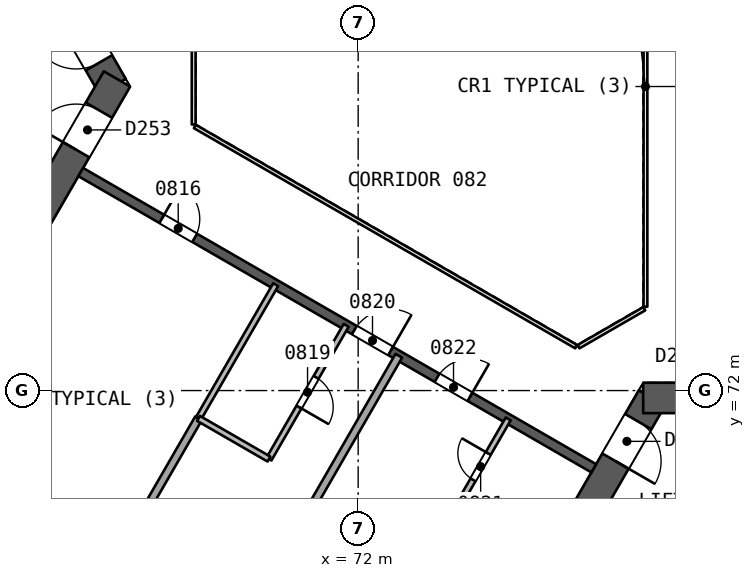
"""IFC4 building model, lengths in metres.
Left out: names, types, materials, properties, quantities, classifications, styles, units other than length and angle.
Written with IfcOpenShell. Run it as: python <this file> out.ifc"""

import sys

from ifc_helpers import new_model, si_unit, direction, frame, frame_2d, origin, place, context, subcontext, project, spatial, rectangle, extrude, element, fill, save


model = new_model("IFC4")
c1 = context("Model", 3, precision=1e-05, world=origin(), true_north=direction((0.0, 1.0)))
c2 = subcontext(c1, "Body", "Model", "MODEL_VIEW")
j1 = project(units=[si_unit("LENGTHUNIT", "METRE"), si_unit("PLANEANGLEUNIT", "RADIAN")], contexts=[c1])
p1 = place(None, origin())
s1 = spatial("IfcSite", under=j1, at=p1, CompositionType="ELEMENT")
p2 = place(p1, origin())
s2 = spatial("IfcBuilding", under=s1, at=p2, CompositionType="ELEMENT")
p3 = place(p2, frame((0.0, 0.0, 41.1)))
s3 = spatial("IfcBuildingStorey", under=s2, at=p3, CompositionType="ELEMENT", Elevation=41.1)
p4 = place(p3, frame((65.538, 80.0, 0.0), z_axis=(0.0, 0.0, 1.0), x_axis=(-0.49999662545, 0.866027352073, 0.0)))
e1 = element("IfcWall", 1, at=p4, inside=s3, PredefinedType="SHEAR", context=c2, shape_type="SweptSolid", body=[
    extrude(rectangle(XDim=10.149, YDim=0.8, at=frame_2d((5.074, 0.0))), origin(), (0.0, 0.0, 1.0), 3.7),
])
p5 = place(p4, frame((0.719, 0.0, 0.0)))
e2 = element("IfcOpeningElement", 2, at=p5, cuts=e1, PredefinedType="OPENING", context=c2, shape_type="SweptSolid", body=[
    extrude(rectangle(XDim=1.2, YDim=2.1, at=frame_2d((0.6, 1.05))), frame((0.0, 0.411, 0.0), z_axis=(0.0, -1.0, 0.0), x_axis=(1.0, 0.0, 0.0)), (0.0, 0.0, 1.0), 0.821),
])
p6 = place(p3, frame((60.664, 71.557, 0.0), z_axis=(0.0, 0.0, 1.0), x_axis=(0.50000409368, 0.866023040284, 0.0)))
e3 = element("IfcWall", 3, at=p6, inside=s3, PredefinedType="SHEAR", context=c2, shape_type="SweptSolid", body=[
    extrude(rectangle(XDim=9.98, YDim=0.8, at=frame_2d((4.99, 0.0))), origin(), (0.0, 0.0, 1.0), 3.7),
])
p7 = place(p6, frame((7.83, 0.0, 0.0)))
e4 = element("IfcOpeningElement", 4, at=p7, cuts=e3, PredefinedType="OPENING", context=c2, shape_type="SweptSolid", body=[
    extrude(rectangle(XDim=1.2, YDim=2.1, at=frame_2d((0.6, 1.05))), frame((0.0, 0.411, 0.0), z_axis=(0.0, -1.0, 0.0), x_axis=(1.0, 0.0, 0.0)), (0.0, 0.0, 1.0), 0.821),
])
p8 = place(p3, frame((79.731, 71.806, 0.0), z_axis=(0.0, 0.0, 1.0), x_axis=(-0.49999662545, -0.866027352073, 0.0)))
e5 = element("IfcWall", 5, at=p8, inside=s3, PredefinedType="SHEAR", context=c2, shape_type="SweptSolid", body=[
    extrude(rectangle(XDim=10.149, YDim=0.8, at=frame_2d((5.074, 0.0))), origin(), (0.0, 0.0, 1.0), 3.7),
])
p9 = place(p8, frame((0.719, 0.0, 0.0)))
e6 = element("IfcOpeningElement", 6, at=p9, cuts=e5, PredefinedType="OPENING", context=c2, shape_type="SweptSolid", body=[
    extrude(rectangle(XDim=1.2, YDim=2.1, at=frame_2d((0.6, 1.05))), frame((0.0, 0.411, 0.0), z_axis=(0.0, -1.0, 0.0), x_axis=(1.0, 0.0, 0.0)), (0.0, 0.0, 1.0), 0.821),
])
p10 = place(p3, frame((89.48, 71.806, 0.0), z_axis=(0.0, 0.0, 1.0), x_axis=(-1.0, 0.0, 0.0)))
e7 = element("IfcWall", 7, at=p10, inside=s3, PredefinedType="SHEAR", context=c2, shape_type="SweptSolid", body=[
    extrude(rectangle(XDim=9.98, YDim=0.8, at=frame_2d((4.99, 0.0))), origin(), (0.0, 0.0, 1.0), 3.7),
])
p11 = place(p10, frame((7.83, 0.0, 0.0)))
e8 = element("IfcOpeningElement", 8, at=p11, cuts=e7, PredefinedType="OPENING", context=c2, shape_type="SweptSolid", body=[
    extrude(rectangle(XDim=1.2, YDim=2.1, at=frame_2d((0.6, 1.05))), frame((0.0, 0.411, 0.0), z_axis=(0.0, -1.0, 0.0), x_axis=(1.0, 0.0, 0.0)), (0.0, 0.0, 1.0), 0.821),
])
p12 = place(p3, frame((64.7, 77.748, 0.0), z_axis=(0.0, 0.0, 1.0), x_axis=(0.866026492143, -0.499998114903, 0.0)))
e9 = element("IfcWall", 9, at=p12, inside=s3, PredefinedType="SHEAR", context=c2, shape_type="SweptSolid", body=[
    extrude(rectangle(XDim=15.588, YDim=0.25, at=frame_2d((7.794, 0.0))), origin(), (0.0, 0.0, 1.0), 3.2),
])
p13 = place(p12, frame((2.462, 0.0, 0.0)))
e10 = element("IfcOpeningElement", 10, at=p13, cuts=e9, PredefinedType="OPENING", context=c2, shape_type="SweptSolid", body=[
    extrude(rectangle(XDim=1.0, YDim=2.1, at=frame_2d((0.5, 1.05))), frame((0.0, 0.135, 0.0), z_axis=(0.0, -1.0, 0.0), x_axis=(1.0, 0.0, 0.0)), (0.0, 0.0, 1.0), 0.271),
])
p14 = place(p12, frame((8.315, 0.0, 0.0)))
e11 = element("IfcOpeningElement", 11, at=p14, cuts=e9, PredefinedType="OPENING", context=c2, shape_type="SweptSolid", body=[
    extrude(rectangle(XDim=1.1, YDim=2.1, at=frame_2d((0.55, 1.05))), frame((0.0, 0.135, 0.0), z_axis=(0.0, -1.0, 0.0), x_axis=(1.0, 0.0, 0.0)), (0.0, 0.0, 1.0), 0.271),
])
p15 = place(p12, frame((10.827, 0.0, 0.0)))
e12 = element("IfcOpeningElement", 12, at=p15, cuts=e9, PredefinedType="OPENING", context=c2, shape_type="SweptSolid", body=[
    extrude(rectangle(XDim=1.0, YDim=2.1, at=frame_2d((0.5, 1.05))), frame((0.0, 0.135, 0.0), z_axis=(0.0, -1.0, 0.0), x_axis=(1.0, 0.0, 0.0)), (0.0, 0.0, 1.0), 0.271),
])
p16 = place(p3, frame((62.817, 62.639, 0.0), z_axis=(0.0, 0.0, 1.0), x_axis=(0.499984050028, 0.866034612309, 0.0)))
e13 = element("IfcWall", 13, at=p16, inside=s3, PredefinedType="PARTITIONING", context=c2, shape_type="SweptSolid", body=[
    extrude(rectangle(XDim=9.964, YDim=0.2, at=frame_2d((4.982, 0.0))), origin(), (0.0, 0.0, 1.0), 3.2),
])
p17 = place(p3, frame((67.798, 71.268, 0.0), z_axis=(0.0, 0.0, 1.0), x_axis=(0.500029316959, 0.866008476969, 0.0)))
e14 = element("IfcWall", 14, at=p17, inside=s3, PredefinedType="PARTITIONING", context=c2, shape_type="SweptSolid", body=[
    extrude(rectangle(XDim=4.063, YDim=0.15, at=frame_2d((2.032, 0.0))), origin(), (0.0, 0.0, 1.0), 3.2),
])
p18 = place(p3, frame((71.684, 73.716, 0.0), z_axis=(0.0, 0.0, 1.0), x_axis=(-0.500010271798, -0.866019473278, 0.0)))
e15 = element("IfcWall", 15, at=p18, inside=s3, PredefinedType="PARTITIONING", context=c2, shape_type="SweptSolid", body=[
    extrude(rectangle(XDim=4.063, YDim=0.15, at=frame_2d((2.031, 0.0))), origin(), (0.0, 0.0, 1.0), 3.2),
])
p19 = place(p18, frame((1.582, 0.0, 0.0)))
e16 = element("IfcOpeningElement", 16, at=p19, cuts=e15, PredefinedType="OPENING", context=c2, shape_type="SweptSolid", body=[
    extrude(rectangle(XDim=0.9, YDim=2.1, at=frame_2d((0.45, 1.05))), frame((0.0, 0.085, 0.0), z_axis=(0.0, -1.0, 0.0), x_axis=(1.0, 0.0, 0.0)), (0.0, 0.0, 1.0), 0.171),
])
p20 = place(p3, frame((69.653, 70.197, 0.0), z_axis=(0.0, 0.0, 1.0), x_axis=(-0.86605268637, 0.499952742198, 0.0)))
e17 = element("IfcWall", 17, at=p20, inside=s3, PredefinedType="PARTITIONING", context=c2, shape_type="SweptSolid", body=[
    extrude(rectangle(XDim=2.141, YDim=0.15, at=frame_2d((1.071, 0.0))), origin(), (0.0, 0.0, 1.0), 3.2),
])
p21 = place(p3, frame((66.057, 60.768, 0.0), z_axis=(0.0, 0.0, 1.0), x_axis=(0.499997162821, 0.866027041824, 0.0)))
e18 = element("IfcWall", 18, at=p21, inside=s3, PredefinedType="PARTITIONING", context=c2, shape_type="SweptSolid", body=[
    extrude(rectangle(XDim=14.027, YDim=0.2, at=frame_2d((7.013, 0.0))), origin(), (0.0, 0.0, 1.0), 3.2),
])
p22 = place(p3, frame((74.498, 68.743, 0.0), z_axis=(0.0, 0.0, 1.0), x_axis=(0.499987231761, 0.866032775405, 0.0)))
e19 = element("IfcWall", 19, at=p22, inside=s3, PredefinedType="PARTITIONING", context=c2, shape_type="SweptSolid", body=[
    extrude(rectangle(XDim=2.9, YDim=0.15, at=frame_2d((1.45, 0.0))), origin(), (0.0, 0.0, 1.0), 3.2),
])
p23 = place(p22, frame((1.05, 0.0, 0.0)))
e20 = element("IfcOpeningElement", 20, at=p23, cuts=e19, PredefinedType="OPENING", context=c2, shape_type="SweptSolid", body=[
    extrude(rectangle(XDim=0.8, YDim=2.1, at=frame_2d((0.4, 1.05))), frame((0.0, 0.085, 0.0), z_axis=(0.0, -1.0, 0.0), x_axis=(1.0, 0.0, 0.0)), (0.0, 0.0, 1.0), 0.171),
])
p24 = place(p3, frame((90.854, 46.28, 0.0), z_axis=(0.0, 0.0, 1.0), x_axis=(-0.866026630825, 0.499997874697, 0.0)))
e21 = element("IfcWall", 21, at=p24, inside=s3, PredefinedType="SOLIDWALL", context=c2, shape_type="SweptSolid", body=[
    extrude(rectangle(XDim=61.18, YDim=0.3, at=frame_2d((30.59, 0.0))), origin(), (0.0, 0.0, 1.0), 3.2),
])
p25 = place(p24, frame((29.39, 0.0, 0.0)))
e22 = element("IfcOpeningElement", 22, at=p25, cuts=e21, PredefinedType="OPENING", context=c2, shape_type="SweptSolid", body=[
    extrude(rectangle(XDim=2.4, YDim=2.4, at=frame_2d((1.2, 1.2))), frame((0.0, 0.161, 0.0), z_axis=(0.0, -1.0, 0.0), x_axis=(1.0, 0.0, 0.0)), (0.0, 0.0, 1.0), 0.321),
])
p26 = place(p24, frame((34.223, 0.0, 0.0)))
e23 = element("IfcOpeningElement", 23, at=p26, cuts=e21, PredefinedType="OPENING", context=c2, shape_type="SweptSolid", body=[
    extrude(rectangle(XDim=2.4, YDim=2.4, at=frame_2d((1.2, 1.2))), frame((0.0, 0.161, 0.0), z_axis=(0.0, -1.0, 0.0), x_axis=(1.0, 0.0, 0.0)), (0.0, 0.0, 1.0), 0.321),
])
p27 = place(p24, frame((47.439, 0.0, 0.0)))
e24 = element("IfcOpeningElement", 24, at=p27, cuts=e21, PredefinedType="OPENING", context=c2, shape_type="SweptSolid", body=[
    extrude(rectangle(XDim=2.4, YDim=2.4, at=frame_2d((1.2, 1.2))), frame((0.0, 0.161, 0.0), z_axis=(0.0, -1.0, 0.0), x_axis=(1.0, 0.0, 0.0)), (0.0, 0.0, 1.0), 0.321),
])
p28 = place(p24, frame((13.116, 0.0, 0.0)))
e25 = element("IfcOpeningElement", 25, at=p28, cuts=e21, PredefinedType="OPENING", context=c2, shape_type="SweptSolid", body=[
    extrude(rectangle(XDim=2.4, YDim=2.4, at=frame_2d((1.2, 1.2))), frame((0.0, 0.161, 0.0), z_axis=(0.0, -1.0, 0.0), x_axis=(1.0, 0.0, 0.0)), (0.0, 0.0, 1.0), 0.321),
])
p29 = place(p3, frame((77.135, 64.952, 0.0), z_axis=(0.0, 0.0, 1.0), x_axis=(0.866031916153, 0.499988720078, 0.0)))
e26 = element("IfcWall", 26, at=p29, inside=s3, PredefinedType="SOLIDWALL", context=c2, shape_type="SweptSolid", body=[
    extrude(rectangle(XDim=11.35, YDim=0.2, at=frame_2d((5.675, 0.0))), origin(), (0.0, 0.0, 1.0), 3.2),
])
p30 = place(p3, frame((79.56, 74.206, 0.0), z_axis=(0.0, 0.0, 1.0), x_axis=(0.0, 1.0, 0.0)))
e27 = element("IfcWall", 27, at=p30, inside=s3, PredefinedType="PARTITIONING", context=c2, shape_type="SweptSolid", body=[
    extrude(rectangle(XDim=11.588, YDim=0.1, at=frame_2d((5.794, 0.0))), origin(), (0.0, 0.0, 1.0), 3.2),
])
p31 = place(p3, frame((67.672, 81.0, 0.0), z_axis=(0.0, 0.0, 1.0), x_axis=(0.0, -1.0, 0.0)))
e28 = element("IfcWall", 28, at=p31, inside=s3, PredefinedType="PARTITIONING", context=c2, shape_type="SweptSolid", body=[
    extrude(rectangle(XDim=2.0, YDim=0.1, at=frame_2d((1.0, 0.0))), origin(), (0.0, 0.0, 1.0), 3.2),
])
p32 = place(p3, frame((67.702, 78.948, 0.0), z_axis=(0.0, 0.0, 1.0), x_axis=(0.866026658274, -0.499997827154, 0.0)))
e29 = element("IfcWall", 29, at=p32, inside=s3, PredefinedType="PARTITIONING", context=c2, shape_type="SweptSolid", body=[
    extrude(rectangle(XDim=11.588, YDim=0.1, at=frame_2d((5.794, 0.0))), origin(), (0.0, 0.0, 1.0), 3.2),
])
p33 = place(p3, frame((77.798, 73.154, 0.0), z_axis=(0.0, 0.0, 1.0), x_axis=(0.866041268327, 0.499972520799, 0.0)))
e30 = element("IfcWall", 30, at=p33, inside=s3, PredefinedType="PARTITIONING", context=c2, shape_type="SweptSolid", body=[
    extrude(rectangle(XDim=2.0, YDim=0.1, at=frame_2d((1.0, 0.0))), origin(), (0.0, 0.0, 1.0), 3.2),
])
p34 = place(p13, origin())
e31 = element("IfcDoor", 31, at=p34, inside=s3, OperationType="SINGLE_SWING_LEFT", PredefinedType="NOTDEFINED", context=c2, shape_type="SweptSolid", body=[
    extrude(rectangle(XDim=1.0, YDim=2.1, at=frame_2d((0.5, 1.05))), frame((0.0, 0.025, 0.0), z_axis=(0.0, -1.0, 0.0), x_axis=(1.0, 0.0, 0.0)), (0.0, 0.0, 1.0), 0.05),
])
fill(e10, e31)
p35 = place(p19, origin())
e32 = element("IfcDoor", 32, at=p35, inside=s3, OperationType="SINGLE_SWING_RIGHT", PredefinedType="NOTDEFINED", context=c2, shape_type="SweptSolid", body=[
    extrude(rectangle(XDim=0.9, YDim=2.1, at=frame_2d((0.45, 1.05))), frame((0.0, 0.025, 0.0), z_axis=(0.0, -1.0, 0.0), x_axis=(1.0, 0.0, 0.0)), (0.0, 0.0, 1.0), 0.05),
])
fill(e16, e32)
p36 = place(p14, origin())
e33 = element("IfcDoor", 33, at=p36, inside=s3, OperationType="SINGLE_SWING_RIGHT", PredefinedType="NOTDEFINED", context=c2, shape_type="SweptSolid", body=[
    extrude(rectangle(XDim=1.1, YDim=2.1, at=frame_2d((0.55, 1.05))), frame((0.0, 0.025, 0.0), z_axis=(0.0, -1.0, 0.0), x_axis=(1.0, 0.0, 0.0)), (0.0, 0.0, 1.0), 0.05),
])
fill(e11, e33)
p37 = place(p23, origin())
e34 = element("IfcDoor", 34, at=p37, inside=s3, OperationType="SINGLE_SWING_RIGHT", PredefinedType="NOTDEFINED", context=c2, shape_type="SweptSolid", body=[
    extrude(rectangle(XDim=0.8, YDim=2.1, at=frame_2d((0.4, 1.05))), frame((0.0, 0.025, 0.0), z_axis=(0.0, -1.0, 0.0), x_axis=(1.0, 0.0, 0.0)), (0.0, 0.0, 1.0), 0.05),
])
fill(e20, e34)
p38 = place(p15, origin())
e35 = element("IfcDoor", 35, at=p38, inside=s3, OperationType="SINGLE_SWING_RIGHT", PredefinedType="NOTDEFINED", context=c2, shape_type="SweptSolid", body=[
    extrude(rectangle(XDim=1.0, YDim=2.1, at=frame_2d((0.5, 1.05))), frame((0.0, 0.025, 0.0), z_axis=(0.0, -1.0, 0.0), x_axis=(1.0, 0.0, 0.0)), (0.0, 0.0, 1.0), 0.05),
])
fill(e12, e35)
p39 = place(p5, origin())
e36 = element("IfcDoor", 36, at=p39, inside=s3, OperationType="SINGLE_SWING_RIGHT", PredefinedType="NOTDEFINED", context=c2, shape_type="SweptSolid", body=[
    extrude(rectangle(XDim=1.2, YDim=2.1, at=frame_2d((0.6, 1.05))), frame((0.0, 0.025, 0.0), z_axis=(0.0, -1.0, 0.0), x_axis=(1.0, 0.0, 0.0)), (0.0, 0.0, 1.0), 0.05),
])
fill(e2, e36)
p40 = place(p7, origin())
e37 = element("IfcDoor", 37, at=p40, inside=s3, OperationType="SINGLE_SWING_LEFT", PredefinedType="NOTDEFINED", context=c2, shape_type="SweptSolid", body=[
    extrude(rectangle(XDim=1.2, YDim=2.1, at=frame_2d((0.6, 1.05))), frame((0.0, 0.025, 0.0), z_axis=(0.0, -1.0, 0.0), x_axis=(1.0, 0.0, 0.0)), (0.0, 0.0, 1.0), 0.05),
])
fill(e4, e37)
p41 = place(p9, origin())
e38 = element("IfcDoor", 38, at=p41, inside=s3, OperationType="SINGLE_SWING_RIGHT", PredefinedType="NOTDEFINED", context=c2, shape_type="SweptSolid", body=[
    extrude(rectangle(XDim=1.2, YDim=2.1, at=frame_2d((0.6, 1.05))), frame((0.0, 0.025, 0.0), z_axis=(0.0, -1.0, 0.0), x_axis=(1.0, 0.0, 0.0)), (0.0, 0.0, 1.0), 0.05),
])
fill(e6, e38)
save(model, sys.argv[1])
